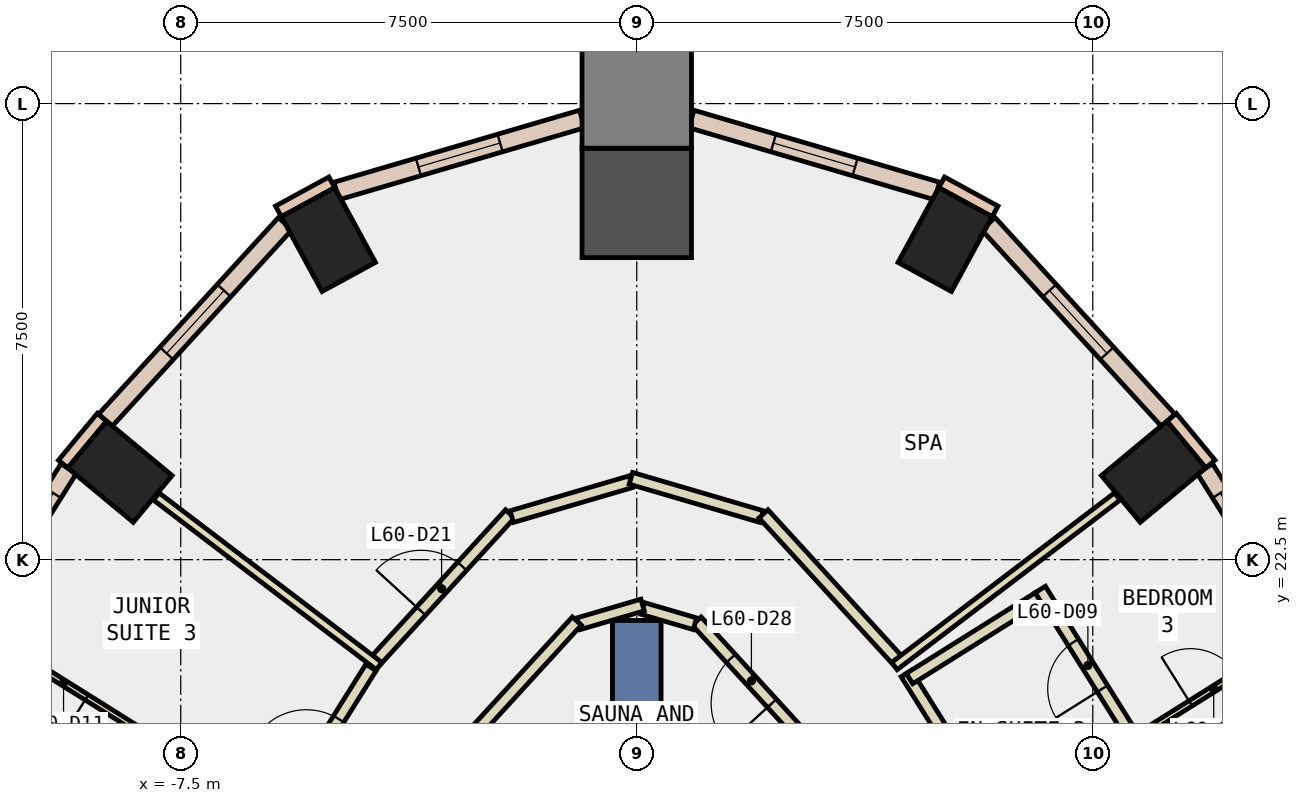
"""IFC4 building model, lengths in metres.
Left out: names, types, materials, properties, quantities, classifications, styles, units other than length and angle.
Written with IfcOpenShell. Run it as: python <this file> out.ifc"""

import sys

from ifc_helpers import new_model, si_unit, direction, frame, frame_2d, origin, origin_2d, place, context, subcontext, project, spatial, rectangle, extrude, element, fill, save


model = new_model("IFC4")
c1 = context("Model", 3, precision=1e-05, world=origin(), true_north=direction((0.0, 1.0)))
c2 = subcontext(c1, "Body", "Model", "MODEL_VIEW")
j1 = project(units=[si_unit("LENGTHUNIT", "METRE"), si_unit("PLANEANGLEUNIT", "RADIAN")], contexts=[c1])
p1 = place(None, origin())
s1 = spatial("IfcSite", under=j1, at=p1, CompositionType="ELEMENT")
p2 = place(p1, origin())
s2 = spatial("IfcBuilding", under=s1, at=p2, CompositionType="ELEMENT")
p3 = place(p2, frame((0.0, 0.0, 263.0)))
s3 = spatial("IfcBuildingStorey", under=s2, at=p3, CompositionType="ELEMENT", Elevation=263.0)
for number, where, z_axis, x_axis in (
    (1, (8.5, 23.946, -0.34), (0.0, 0.0, 1.0), (-0.639, 0.769, 0.0)),
    (2, (5.071, 27.764, -0.34), (0.0, 0.0, 1.0), (-0.878, 0.478, 0.0)),
):
    element("IfcColumn", number, at=place(p3, frame(where, z_axis=z_axis, x_axis=x_axis)), inside=s3, PredefinedType="COLUMN", context=c2, shape_type="SweptSolid", body=[
        extrude(rectangle(XDim=1.0, YDim=1.4, at=origin_2d()), origin(), (0.0, 0.0, 1.0), 3.6),
    ])
p4 = place(p3, frame((0.0, 28.367, -0.34), z_axis=(0.0, 0.0, 1.0), x_axis=(0.0, 1.0, 0.0)))
e3 = element("IfcColumn", 3, at=p4, inside=s3, PredefinedType="COLUMN", context=c2, shape_type="SweptSolid", body=[
    extrude(rectangle(XDim=1.8, YDim=1.8, at=origin_2d()), origin(), (0.0, 0.0, 1.0), 3.6),
])
for number, where, z_axis, x_axis in (
    (4, (-5.071, 27.764, -0.34), (0.0, 0.0, 1.0), (0.878, 0.478, 0.0)),
    (5, (-8.5, 23.946, -0.34), (0.0, 0.0, 1.0), (0.639, 0.769, 0.0)),
):
    element("IfcColumn", number, at=place(p3, frame(where, z_axis=z_axis, x_axis=x_axis)), inside=s3, PredefinedType="COLUMN", context=c2, shape_type="SweptSolid", body=[
        extrude(rectangle(XDim=1.0, YDim=1.4, at=origin_2d()), origin(), (0.0, 0.0, 1.0), 3.6),
    ])
p5 = place(p3, frame((0.0, 30.167, -0.34), z_axis=(0.0, 0.0, 1.0), x_axis=(0.0, 1.0, 0.0)))
e6 = element("IfcColumn", 6, at=p5, inside=s3, PredefinedType="COLUMN", context=c2, shape_type="SweptSolid", body=[
    extrude(rectangle(XDim=1.8, YDim=1.8, at=origin_2d()), origin(), (0.0, 0.0, 1.0), 3.6),
])
p6 = place(p3, frame((0.0, 12.5, -0.34), z_axis=(0.0, 0.0, 1.0), x_axis=(0.0, 1.0, 0.0)))
e7 = element("IfcWall", 7, at=p6, inside=s3, PredefinedType="SHEAR", context=c2, shape_type="SweptSolid", body=[
    extrude(rectangle(XDim=9.0, YDim=0.8, at=frame_2d((4.5, 0.0))), origin(), (0.0, 0.0, 1.0), 3.6),
])
for number, where, z_axis, x_axis in (
    (8, (5.893, 28.227, 0.0), (0.0, 0.0, 1.0), (-0.878, 0.478, 0.0)),
    (9, (-5.015, 28.705, 0.0), (0.0, 0.0, 1.0), (-0.878, -0.478, 0.0)),
):
    element("IfcWall", number, at=place(p3, frame(where, z_axis=z_axis, x_axis=x_axis)), inside=s3, PredefinedType="STANDARD", context=c2, shape_type="SweptSolid", body=[
        extrude(rectangle(XDim=1.0, YDim=0.2, at=frame_2d((0.5, 0.0))), origin(), (0.0, 0.0, 1.0), 3.26),
    ])
for number, where, z_axis, x_axis in (
    (10, (9.434, 24.072, 0.0), (0.0, 0.0, 1.0), (-0.638, 0.77, 0.0)),
    (11, (-8.796, 24.842, 0.0), (0.0, 0.0, 1.0), (-0.638, -0.77, 0.0)),
):
    element("IfcWall", number, at=place(p3, frame(where, z_axis=z_axis, x_axis=x_axis)), inside=s3, PredefinedType="STANDARD", context=c2, shape_type="SweptSolid", body=[
        extrude(rectangle(XDim=1.0, YDim=0.2, at=frame_2d((0.5, 0.0))), origin(), (0.0, 0.0, 1.0), 3.26),
    ])
p7 = place(p3, frame((12.372, 19.166, 0.0), z_axis=(0.0, 0.0, 1.0), x_axis=(-0.531137483242, 0.847285650708, 0.0)))
e12 = element("IfcWall", 12, at=p7, inside=s3, PredefinedType="STANDARD", context=c2, shape_type="SweptSolid", body=[
    extrude(rectangle(XDim=5.703, YDim=0.3, at=frame_2d((2.852, 0.0))), origin(), (0.0, 0.0, 1.0), 3.26),
])
p8 = place(p7, frame((0.476, 0.0, 0.9)))
e13 = element("IfcOpeningElement", 13, at=p8, cuts=e12, PredefinedType="OPENING", context=c2, shape_type="SweptSolid", body=[
    extrude(rectangle(XDim=1.9, YDim=2.0, at=frame_2d((0.95, 1.0))), frame((0.0, 0.16, 0.0), z_axis=(0.0, -1.0, 0.0), x_axis=(1.0, 0.0, 0.0)), (0.0, 0.0, 1.0), 0.32),
])
p9 = place(p7, frame((3.327, 0.0, 0.9)))
e14 = element("IfcOpeningElement", 14, at=p9, cuts=e12, PredefinedType="OPENING", context=c2, shape_type="SweptSolid", body=[
    extrude(rectangle(XDim=1.9, YDim=2.0, at=frame_2d((0.95, 1.0))), frame((0.0, 0.16, 0.0), z_axis=(0.0, -1.0, 0.0), x_axis=(1.0, 0.0, 0.0)), (0.0, 0.0, 1.0), 0.32),
])
p10 = place(p3, frame((8.739, 24.794, 0.0), z_axis=(0.0, 0.0, 1.0), x_axis=(-0.675143863554, 0.737686087374, 0.0)))
e15 = element("IfcWall", 15, at=p10, inside=s3, PredefinedType="STANDARD", context=c2, shape_type="SweptSolid", body=[
    extrude(rectangle(XDim=4.38, YDim=0.3, at=frame_2d((2.19, 0.0))), origin(), (0.0, 0.0, 1.0), 3.26),
])
p11 = place(p10, frame((1.49, 0.0, 0.9)))
e16 = element("IfcOpeningElement", 16, at=p11, cuts=e15, PredefinedType="OPENING", context=c2, shape_type="SweptSolid", body=[
    extrude(rectangle(XDim=1.4, YDim=2.0, at=frame_2d((0.7, 1.0))), frame((0.0, 0.16, 0.0), z_axis=(0.0, -1.0, 0.0), x_axis=(1.0, 0.0, 0.0)), (0.0, 0.0, 1.0), 0.32),
])
p12 = place(p3, frame((4.939, 28.563, 0.0), z_axis=(0.0, 0.0, 1.0), x_axis=(-0.959632861734, 0.281255703373, 0.0)))
e17 = element("IfcWall", 17, at=p12, inside=s3, PredefinedType="STANDARD", context=c2, shape_type="SweptSolid", body=[
    extrude(rectangle(XDim=4.21, YDim=0.3, at=frame_2d((2.105, 0.0))), origin(), (0.0, 0.0, 1.0), 3.26),
])
p13 = place(p12, frame((1.405, 0.0, 0.9)))
e18 = element("IfcOpeningElement", 18, at=p13, cuts=e17, PredefinedType="OPENING", context=c2, shape_type="SweptSolid", body=[
    extrude(rectangle(XDim=1.4, YDim=2.0, at=frame_2d((0.7, 1.0))), frame((0.0, 0.16, 0.0), z_axis=(0.0, -1.0, 0.0), x_axis=(1.0, 0.0, 0.0)), (0.0, 0.0, 1.0), 0.32),
])
p14 = place(p3, frame((-0.899, 29.747, 0.0), z_axis=(0.0, 0.0, 1.0), x_axis=(-0.959632861734, -0.281255703373, 0.0)))
e19 = element("IfcWall", 19, at=p14, inside=s3, PredefinedType="STANDARD", context=c2, shape_type="SweptSolid", body=[
    extrude(rectangle(XDim=4.21, YDim=0.3, at=frame_2d((2.105, 0.0))), origin(), (0.0, 0.0, 1.0), 3.26),
])
p15 = place(p14, frame((1.405, 0.0, 0.9)))
e20 = element("IfcOpeningElement", 20, at=p15, cuts=e19, PredefinedType="OPENING", context=c2, shape_type="SweptSolid", body=[
    extrude(rectangle(XDim=1.4, YDim=2.0, at=frame_2d((0.7, 1.0))), frame((0.0, 0.16, 0.0), z_axis=(0.0, -1.0, 0.0), x_axis=(1.0, 0.0, 0.0)), (0.0, 0.0, 1.0), 0.32),
])
p16 = place(p3, frame((-5.782, 28.025, 0.0), z_axis=(0.0, 0.0, 1.0), x_axis=(-0.675143863554, -0.737686087374, 0.0)))
e21 = element("IfcWall", 21, at=p16, inside=s3, PredefinedType="STANDARD", context=c2, shape_type="SweptSolid", body=[
    extrude(rectangle(XDim=4.38, YDim=0.3, at=frame_2d((2.19, 0.0))), origin(), (0.0, 0.0, 1.0), 3.26),
])
p17 = place(p16, frame((1.49, 0.0, 0.9)))
e22 = element("IfcOpeningElement", 22, at=p17, cuts=e21, PredefinedType="OPENING", context=c2, shape_type="SweptSolid", body=[
    extrude(rectangle(XDim=1.4, YDim=2.0, at=frame_2d((0.7, 1.0))), frame((0.0, 0.16, 0.0), z_axis=(0.0, -1.0, 0.0), x_axis=(1.0, 0.0, 0.0)), (0.0, 0.0, 1.0), 0.32),
])
p18 = place(p3, frame((-9.343, 23.998, 0.0), z_axis=(0.0, 0.0, 1.0), x_axis=(-0.531137483242, -0.847285650708, 0.0)))
e23 = element("IfcWall", 23, at=p18, inside=s3, PredefinedType="STANDARD", context=c2, shape_type="SweptSolid", body=[
    extrude(rectangle(XDim=5.703, YDim=0.3, at=frame_2d((2.852, 0.0))), origin(), (0.0, 0.0, 1.0), 3.26),
])
p19 = place(p18, frame((0.476, 0.0, 0.9)))
e24 = element("IfcOpeningElement", 24, at=p19, cuts=e23, PredefinedType="OPENING", context=c2, shape_type="SweptSolid", body=[
    extrude(rectangle(XDim=1.9, YDim=2.0, at=frame_2d((0.95, 1.0))), frame((0.0, 0.16, 0.0), z_axis=(0.0, -1.0, 0.0), x_axis=(1.0, 0.0, 0.0)), (0.0, 0.0, 1.0), 0.32),
])
p20 = place(p18, frame((3.327, 0.0, 0.9)))
e25 = element("IfcOpeningElement", 25, at=p20, cuts=e23, PredefinedType="OPENING", context=c2, shape_type="SweptSolid", body=[
    extrude(rectangle(XDim=1.9, YDim=2.0, at=frame_2d((0.95, 1.0))), frame((0.0, 0.16, 0.0), z_axis=(0.0, -1.0, 0.0), x_axis=(1.0, 0.0, 0.0)), (0.0, 0.0, 1.0), 0.32),
])
p21 = place(p3, frame((2.787, 19.522, 0.0), z_axis=(0.0, 0.0, 1.0), x_axis=(-0.675132105979, 0.73769684795, 0.0)))
e26 = element("IfcWall", 26, at=p21, inside=s3, PredefinedType="PARTITIONING", context=c2, shape_type="SweptSolid", body=[
    extrude(rectangle(XDim=2.669, YDim=0.2, at=frame_2d((1.334, 0.0))), origin(), (0.0, 0.0, 1.0), 3.26),
])
p22 = place(p21, frame((0.835, 0.0, 0.0)))
e27 = element("IfcOpeningElement", 27, at=p22, cuts=e26, PredefinedType="OPENING", context=c2, shape_type="SweptSolid", body=[
    extrude(rectangle(XDim=1.0, YDim=2.1, at=frame_2d((0.5, 1.05))), frame((0.0, 0.11, 0.0), z_axis=(0.0, -1.0, 0.0), x_axis=(1.0, 0.0, 0.0)), (0.0, 0.0, 1.0), 0.22),
])
p23 = place(p3, frame((0.957, 21.446, 0.0), z_axis=(0.0, 0.0, 1.0), x_axis=(-0.959758875404, 0.28082539252, 0.0)))
e28 = element("IfcWall", 28, at=p23, inside=s3, PredefinedType="PARTITIONING", context=c2, shape_type="SweptSolid", body=[
    extrude(rectangle(XDim=0.897, YDim=0.2, at=frame_2d((0.449, 0.0))), origin(), (0.0, 0.0, 1.0), 3.26),
])
p24 = place(p3, frame((0.096, 21.754, 0.0), z_axis=(0.0, 0.0, 1.0), x_axis=(-0.959817848073, -0.280623766849, 0.0)))
e29 = element("IfcWall", 29, at=p24, inside=s3, PredefinedType="PARTITIONING", context=c2, shape_type="SweptSolid", body=[
    extrude(rectangle(XDim=1.097, YDim=0.2, at=frame_2d((0.549, 0.0))), origin(), (0.0, 0.0, 1.0), 3.26),
])
p25 = place(p3, frame((-0.985, 21.491, 0.0), z_axis=(0.0, 0.0, 1.0), x_axis=(-0.675132105979, -0.73769684795, 0.0)))
e30 = element("IfcWall", 30, at=p25, inside=s3, PredefinedType="PARTITIONING", context=c2, shape_type="SweptSolid", body=[
    extrude(rectangle(XDim=2.669, YDim=0.2, at=frame_2d((1.334, 0.0))), origin(), (0.0, 0.0, 1.0), 3.26),
])
p26 = place(p3, frame((4.433, 20.628, 0.0), z_axis=(0.0, 0.0, 1.0), x_axis=(0.531135189756, -0.84728708842, 0.0)))
e31 = element("IfcWall", 31, at=p26, inside=s3, PredefinedType="PARTITIONING", context=c2, shape_type="SweptSolid", body=[
    extrude(rectangle(XDim=2.799, YDim=0.2, at=frame_2d((1.4, 0.0))), origin(), (0.0, 0.0, 1.0), 3.26),
])
p27 = place(p3, frame((-4.335, 20.793, 0.0), z_axis=(0.0, 0.0, 1.0), x_axis=(0.675074517272, 0.737749548377, 0.0)))
e32 = element("IfcWall", 32, at=p27, inside=s3, PredefinedType="PARTITIONING", context=c2, shape_type="SweptSolid", body=[
    extrude(rectangle(XDim=3.334, YDim=0.2, at=frame_2d((1.667, 0.0))), origin(), (0.0, 0.0, 1.0), 3.26),
])
p28 = place(p27, frame((1.167, 0.0, 0.0)))
e33 = element("IfcOpeningElement", 33, at=p28, cuts=e32, PredefinedType="OPENING", context=c2, shape_type="SweptSolid", body=[
    extrude(rectangle(XDim=1.0, YDim=2.1, at=frame_2d((0.5, 1.05))), frame((0.0, 0.11, 0.0), z_axis=(0.0, -1.0, 0.0), x_axis=(1.0, 0.0, 0.0)), (0.0, 0.0, 1.0), 0.22),
])
p29 = place(p3, frame((-2.055, 23.208, 0.0), z_axis=(0.0, 0.0, 1.0), x_axis=(0.959656367963, 0.281175488669, 0.0)))
e34 = element("IfcWall", 34, at=p29, inside=s3, PredefinedType="PARTITIONING", context=c2, shape_type="SweptSolid", body=[
    extrude(rectangle(XDim=2.041, YDim=0.2, at=frame_2d((1.021, 0.0))), origin(), (0.0, 0.0, 1.0), 3.26),
])
p30 = place(p3, frame((-0.096, 23.838, 0.0), z_axis=(0.0, 0.0, 1.0), x_axis=(0.959694419707, -0.281045584886, 0.0)))
e35 = element("IfcWall", 35, at=p30, inside=s3, PredefinedType="PARTITIONING", context=c2, shape_type="SweptSolid", body=[
    extrude(rectangle(XDim=2.241, YDim=0.2, at=frame_2d((1.121, 0.0))), origin(), (0.0, 0.0, 1.0), 3.26),
])
p31 = place(p3, frame((2.084, 23.253, 0.0), z_axis=(0.0, 0.0, 1.0), x_axis=(0.675074517272, -0.737749548377, 0.0)))
e36 = element("IfcWall", 36, at=p31, inside=s3, PredefinedType="PARTITIONING", context=c2, shape_type="SweptSolid", body=[
    extrude(rectangle(XDim=3.334, YDim=0.2, at=frame_2d((1.667, 0.0))), origin(), (0.0, 0.0, 1.0), 3.26),
])
p32 = place(p3, frame((-5.965, 18.185, 0.0), z_axis=(0.0, 0.0, 1.0), x_axis=(0.531256372055, 0.847211111324, 0.0)))
e37 = element("IfcWall", 37, at=p32, inside=s3, PredefinedType="PARTITIONING", context=c2, shape_type="SweptSolid", body=[
    extrude(rectangle(XDim=3.0, YDim=0.2, at=frame_2d((1.5, 0.0))), origin(), (0.0, 0.0, 1.0), 3.26),
])
p33 = place(p32, frame((1.0, 0.0, 0.0)))
e38 = element("IfcOpeningElement", 38, at=p33, cuts=e37, PredefinedType="OPENING", context=c2, shape_type="SweptSolid", body=[
    extrude(rectangle(XDim=1.0, YDim=2.1, at=frame_2d((0.5, 1.05))), frame((0.0, 0.11, 0.0), z_axis=(0.0, -1.0, 0.0), x_axis=(1.0, 0.0, 0.0)), (0.0, 0.0, 1.0), 0.22),
])
p34 = place(p3, frame((8.091, 19.499, 0.0), z_axis=(0.0, 0.0, 1.0), x_axis=(0.847249319986, 0.53119543464, 0.0)))
e39 = element("IfcWall", 39, at=p34, inside=s3, PredefinedType="PARTITIONING", context=c2, shape_type="SweptSolid", body=[
    extrude(rectangle(XDim=3.3, YDim=0.1, at=frame_2d((1.65, 0.0))), origin(), (0.0, 0.0, 1.0), 3.26),
])
p35 = place(p34, frame((1.2, 0.0, 0.0)))
e40 = element("IfcOpeningElement", 40, at=p35, cuts=e39, PredefinedType="OPENING", context=c2, shape_type="SweptSolid", body=[
    extrude(rectangle(XDim=0.9, YDim=2.1, at=frame_2d((0.45, 1.05))), frame((0.0, 0.06, 0.0), z_axis=(0.0, -1.0, 0.0), x_axis=(1.0, 0.0, 0.0)), (0.0, 0.0, 1.0), 0.12),
])
p36 = place(p3, frame((8.203, 19.51, 0.0), z_axis=(0.0, 0.0, 1.0), x_axis=(-0.531218552952, 0.847234825181, 0.0)))
e41 = element("IfcWall", 41, at=p36, inside=s3, PredefinedType="PARTITIONING", context=c2, shape_type="SweptSolid", body=[
    extrude(rectangle(XDim=2.95, YDim=0.2, at=frame_2d((1.475, 0.0))), origin(), (0.0, 0.0, 1.0), 3.26),
])
p37 = place(p36, frame((1.025, 0.0, 0.0)))
e42 = element("IfcOpeningElement", 42, at=p37, cuts=e41, PredefinedType="OPENING", context=c2, shape_type="SweptSolid", body=[
    extrude(rectangle(XDim=0.9, YDim=2.1, at=frame_2d((0.45, 1.05))), frame((0.0, 0.11, 0.0), z_axis=(0.0, -1.0, 0.0), x_axis=(1.0, 0.0, 0.0)), (0.0, 0.0, 1.0), 0.22),
])
p38 = place(p3, frame((6.604, 21.871, 0.0), z_axis=(0.0, 0.0, 1.0), x_axis=(-0.847377617561, -0.530990746866, 0.0)))
e43 = element("IfcWall", 43, at=p38, inside=s3, PredefinedType="PARTITIONING", context=c2, shape_type="SweptSolid", body=[
    extrude(rectangle(XDim=2.499, YDim=0.2, at=frame_2d((1.25, 0.0))), origin(), (0.0, 0.0, 1.0), 3.26),
])
for number, where, z_axis, x_axis in (
    (44, (4.238, 20.751, 0.0), (0.0, 0.0, 1.0), (0.796, 0.606, 0.0)),
    (45, (-4.238, 20.751, 0.0), (0.0, 0.0, 1.0), (-0.796, 0.606, 0.0)),
):
    element("IfcWall", number, at=place(p3, frame(where, z_axis=z_axis, x_axis=x_axis)), inside=s3, PredefinedType="PARTITIONING", context=c2, shape_type="SweptSolid", body=[
        extrude(rectangle(XDim=4.604, YDim=0.15, at=frame_2d((2.302, 0.0))), origin(), (0.0, 0.0, 1.0), 3.26),
    ])
p39 = place(p3, frame((-8.029, 19.598, 0.0), z_axis=(0.0, 0.0, 1.0), x_axis=(-0.847216023371, 0.531248538581, 0.0)))
e46 = element("IfcWall", 46, at=p39, inside=s3, PredefinedType="PARTITIONING", context=c2, shape_type="SweptSolid", body=[
    extrude(rectangle(XDim=3.3, YDim=0.1, at=frame_2d((1.65, 0.0))), origin(), (0.0, 0.0, 1.0), 3.26),
])
p40 = place(p39, frame((1.2, 0.0, 0.0)))
e47 = element("IfcOpeningElement", 47, at=p40, cuts=e46, PredefinedType="OPENING", context=c2, shape_type="SweptSolid", body=[
    extrude(rectangle(XDim=0.9, YDim=2.1, at=frame_2d((0.45, 1.05))), frame((0.0, 0.06, 0.0), z_axis=(0.0, -1.0, 0.0), x_axis=(1.0, 0.0, 0.0)), (0.0, 0.0, 1.0), 0.12),
])
p41 = place(p9, origin())
e48 = element("IfcWindow", 48, at=p41, inside=s3, PartitioningType="SINGLE_PANEL", PredefinedType="WINDOW", context=c2, shape_type="SweptSolid", body=[
    extrude(rectangle(XDim=1.9, YDim=2.0, at=frame_2d((0.95, 1.0))), frame((0.0, 0.03, 0.0), z_axis=(0.0, -1.0, 0.0), x_axis=(1.0, 0.0, 0.0)), (0.0, 0.0, 1.0), 0.06),
])
fill(e14, e48)
p42 = place(p11, origin())
e49 = element("IfcWindow", 49, at=p42, inside=s3, PartitioningType="SINGLE_PANEL", PredefinedType="WINDOW", context=c2, shape_type="SweptSolid", body=[
    extrude(rectangle(XDim=1.4, YDim=2.0, at=frame_2d((0.7, 1.0))), frame((0.0, 0.03, 0.0), z_axis=(0.0, -1.0, 0.0), x_axis=(1.0, 0.0, 0.0)), (0.0, 0.0, 1.0), 0.06),
])
fill(e16, e49)
p43 = place(p13, origin())
e50 = element("IfcWindow", 50, at=p43, inside=s3, PartitioningType="SINGLE_PANEL", PredefinedType="WINDOW", context=c2, shape_type="SweptSolid", body=[
    extrude(rectangle(XDim=1.4, YDim=2.0, at=frame_2d((0.7, 1.0))), frame((0.0, 0.03, 0.0), z_axis=(0.0, -1.0, 0.0), x_axis=(1.0, 0.0, 0.0)), (0.0, 0.0, 1.0), 0.06),
])
fill(e18, e50)
p44 = place(p15, origin())
e51 = element("IfcWindow", 51, at=p44, inside=s3, PartitioningType="SINGLE_PANEL", PredefinedType="WINDOW", context=c2, shape_type="SweptSolid", body=[
    extrude(rectangle(XDim=1.4, YDim=2.0, at=frame_2d((0.7, 1.0))), frame((0.0, 0.03, 0.0), z_axis=(0.0, -1.0, 0.0), x_axis=(1.0, 0.0, 0.0)), (0.0, 0.0, 1.0), 0.06),
])
fill(e20, e51)
p45 = place(p17, origin())
e52 = element("IfcWindow", 52, at=p45, inside=s3, PartitioningType="SINGLE_PANEL", PredefinedType="WINDOW", context=c2, shape_type="SweptSolid", body=[
    extrude(rectangle(XDim=1.4, YDim=2.0, at=frame_2d((0.7, 1.0))), frame((0.0, 0.03, 0.0), z_axis=(0.0, -1.0, 0.0), x_axis=(1.0, 0.0, 0.0)), (0.0, 0.0, 1.0), 0.06),
])
fill(e22, e52)
p46 = place(p19, origin())
e53 = element("IfcWindow", 53, at=p46, inside=s3, PartitioningType="SINGLE_PANEL", PredefinedType="WINDOW", context=c2, shape_type="SweptSolid", body=[
    extrude(rectangle(XDim=1.9, YDim=2.0, at=frame_2d((0.95, 1.0))), frame((0.0, 0.03, 0.0), z_axis=(0.0, -1.0, 0.0), x_axis=(1.0, 0.0, 0.0)), (0.0, 0.0, 1.0), 0.06),
])
fill(e24, e53)
p47 = place(p35, origin())
e54 = element("IfcDoor", 54, at=p47, inside=s3, OperationType="SINGLE_SWING_LEFT", PredefinedType="DOOR", context=c2, shape_type="SweptSolid", body=[
    extrude(rectangle(XDim=0.9, YDim=2.1, at=frame_2d((0.45, 1.05))), frame((0.0, 0.025, 0.0), z_axis=(0.0, -1.0, 0.0), x_axis=(1.0, 0.0, 0.0)), (0.0, 0.0, 1.0), 0.05),
])
fill(e40, e54)
p48 = place(p37, origin())
e55 = element("IfcDoor", 55, at=p48, inside=s3, OperationType="SINGLE_SWING_RIGHT", PredefinedType="DOOR", context=c2, shape_type="SweptSolid", body=[
    extrude(rectangle(XDim=0.9, YDim=2.1, at=frame_2d((0.45, 1.05))), frame((0.0, 0.025, 0.0), z_axis=(0.0, -1.0, 0.0), x_axis=(1.0, 0.0, 0.0)), (0.0, 0.0, 1.0), 0.05),
])
fill(e42, e55)
p49 = place(p33, origin())
e56 = element("IfcDoor", 56, at=p49, inside=s3, OperationType="SINGLE_SWING_LEFT", PredefinedType="DOOR", context=c2, shape_type="SweptSolid", body=[
    extrude(rectangle(XDim=1.0, YDim=2.1, at=frame_2d((0.5, 1.05))), frame((0.0, 0.025, 0.0), z_axis=(0.0, -1.0, 0.0), x_axis=(1.0, 0.0, 0.0)), (0.0, 0.0, 1.0), 0.05),
])
fill(e38, e56)
p50 = place(p40, origin())
e57 = element("IfcDoor", 57, at=p50, inside=s3, OperationType="SINGLE_SWING_RIGHT", PredefinedType="DOOR", context=c2, shape_type="SweptSolid", body=[
    extrude(rectangle(XDim=0.9, YDim=2.1, at=frame_2d((0.45, 1.05))), frame((0.0, 0.025, 0.0), z_axis=(0.0, -1.0, 0.0), x_axis=(1.0, 0.0, 0.0)), (0.0, 0.0, 1.0), 0.05),
])
fill(e47, e57)
p51 = place(p28, origin())
e58 = element("IfcDoor", 58, at=p51, inside=s3, OperationType="SINGLE_SWING_LEFT", PredefinedType="DOOR", context=c2, shape_type="SweptSolid", body=[
    extrude(rectangle(XDim=1.0, YDim=2.1, at=frame_2d((0.5, 1.05))), frame((0.0, 0.025, 0.0), z_axis=(0.0, -1.0, 0.0), x_axis=(1.0, 0.0, 0.0)), (0.0, 0.0, 1.0), 0.05),
])
fill(e33, e58)
p52 = place(p22, origin())
e59 = element("IfcDoor", 59, at=p52, inside=s3, OperationType="SINGLE_SWING_LEFT", PredefinedType="DOOR", context=c2, shape_type="SweptSolid", body=[
    extrude(rectangle(XDim=1.0, YDim=2.1, at=frame_2d((0.5, 1.05))), frame((0.0, 0.025, 0.0), z_axis=(0.0, -1.0, 0.0), x_axis=(1.0, 0.0, 0.0)), (0.0, 0.0, 1.0), 0.05),
])
fill(e27, e59)
save(model, sys.argv[1])
